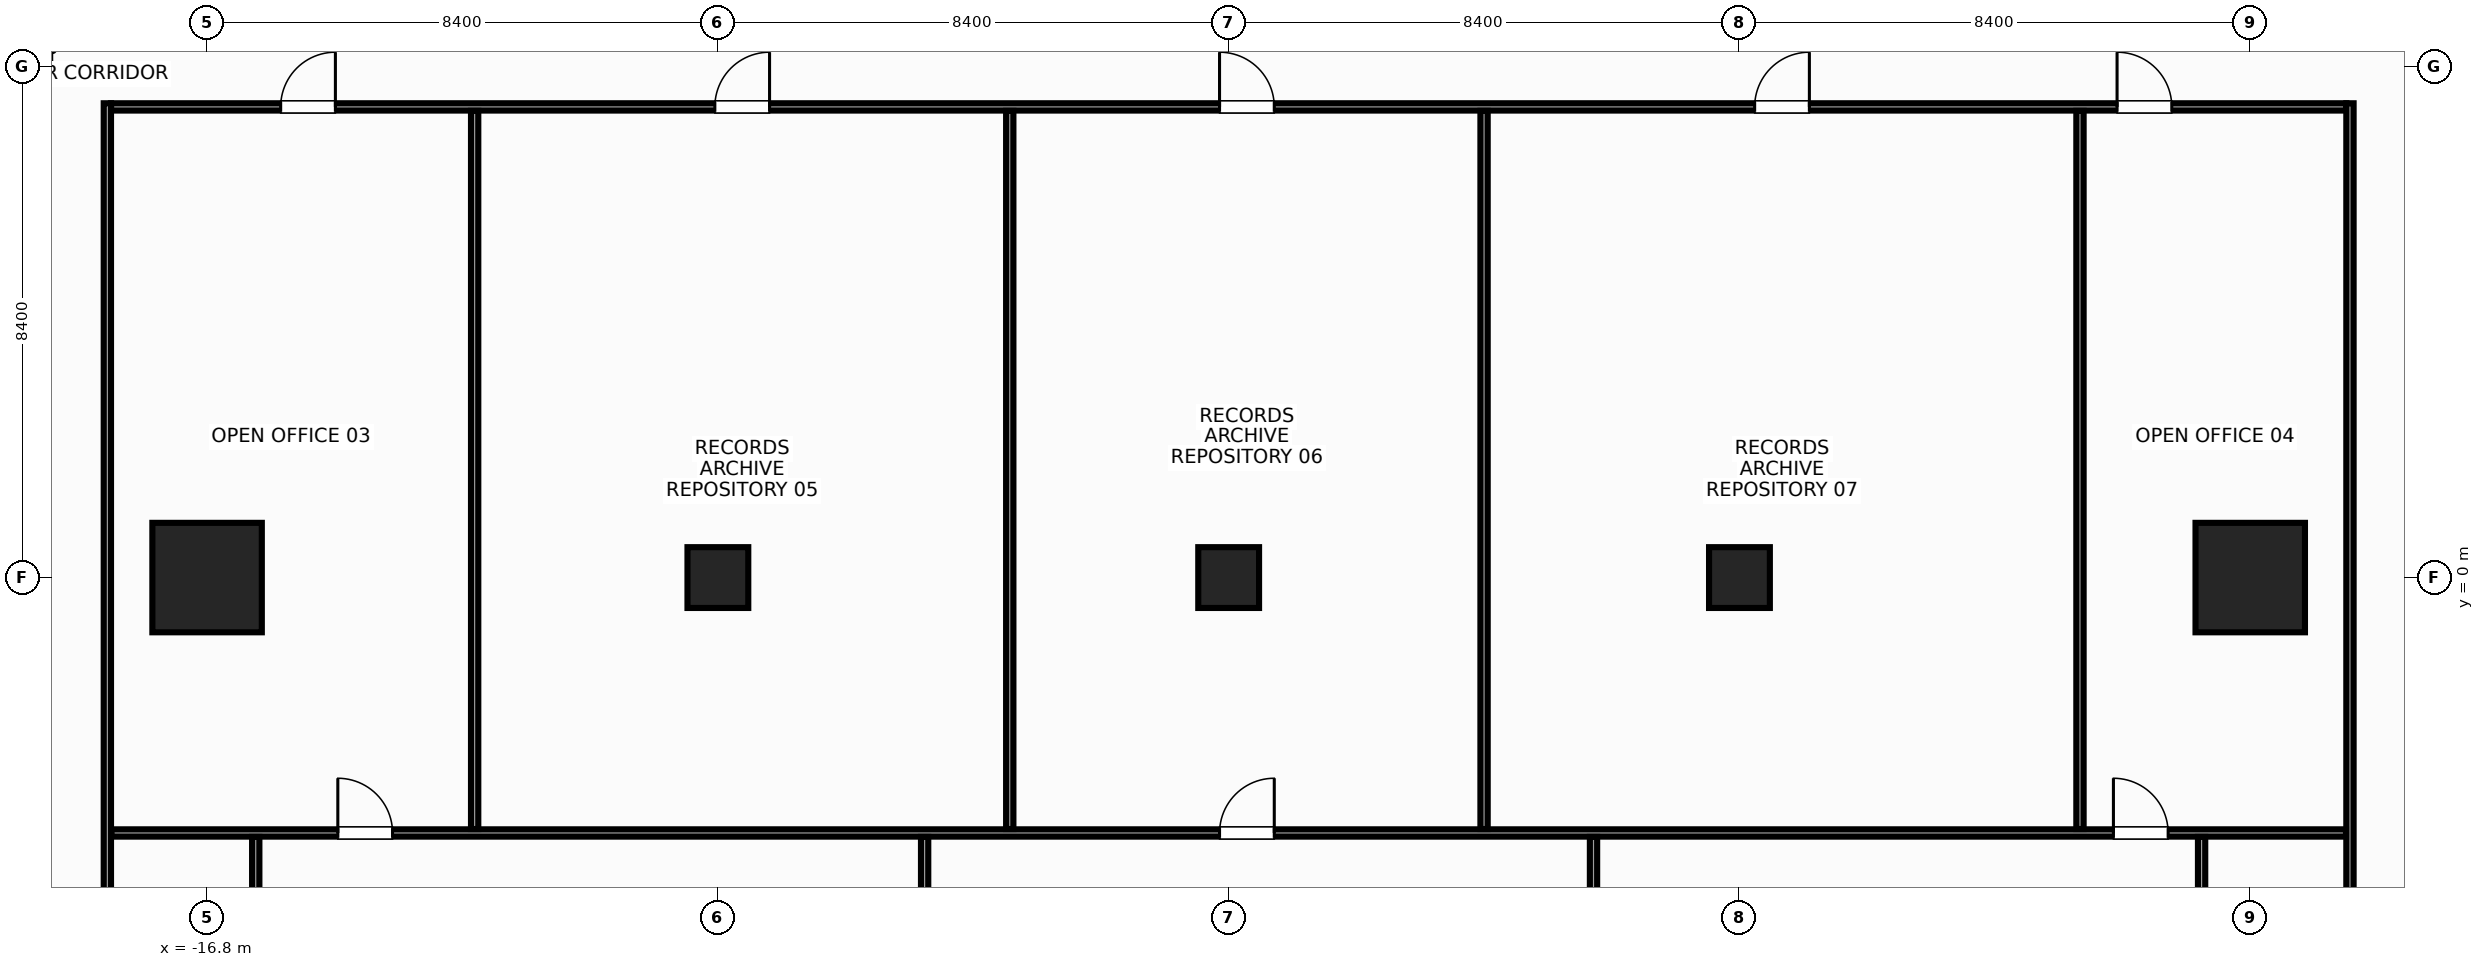
"""IFC4 building model, lengths in metres.
Left out: names, types, materials, properties, quantities, classifications, styles, units other than length and angle.
Written with IfcOpenShell. Run it as: python <this file> out.ifc"""

import sys

from ifc_helpers import new_model, si_unit, direction, frame, frame_2d, origin, origin_with_axes, origin_2d, place, context, subcontext, project, spatial, rectangle, hollow_rectangle, extrude, source, transform, mapped, element, fill, save


model = new_model("IFC4")
c1 = context("Model", 3, precision=1e-05, world=origin(), true_north=direction((0.0, 1.0)))
c2 = subcontext(c1, "Body", "Model", "MODEL_VIEW")
j1 = project(units=[si_unit("LENGTHUNIT", "METRE"), si_unit("PLANEANGLEUNIT", "RADIAN")], contexts=[c1])
p1 = place(None, origin())
s1 = spatial("IfcSite", under=j1, at=p1, CompositionType="ELEMENT")
p2 = place(p1, origin())
s2 = spatial("IfcBuilding", under=s1, at=p2, CompositionType="ELEMENT")
p3 = place(p2, frame((0.0, 0.0, 27.2)))
s3 = spatial("IfcBuildingStorey", under=s2, at=p3, CompositionType="ELEMENT", Elevation=27.2)
m1 = source(origin(), c2, "Body", "SweptSolid", [
    extrude(rectangle(XDim=1.8, YDim=1.8, at=origin_2d()), origin(), (0.0, 0.0, 1.0), 3.6),
])
for number, where, z_axis, x_axis in (
    (1, (-16.8, 0.0, 0.0), (0.0, 0.0, 1.0), (1.0, 0.0, 0.0)),
    (2, (16.8, 0.0, 0.0), (0.0, 0.0, 1.0), (1.0, 0.0, 0.0)),
):
    element("IfcColumn", number, at=place(p3, frame(where, z_axis=z_axis, x_axis=x_axis)), inside=s3, PredefinedType="COLUMN", context=c2, shape_type="MappedRepresentation", body=[
        mapped(m1, transform((0.0, 0.0, 0.0), x_axis=(1.0, 0.0, 0.0), y_axis=(0.0, 1.0, 0.0), z_axis=(0.0, 0.0, 1.0), scale=1.0)),
    ])
m2 = source(origin(), c2, "Body", "SweptSolid", [
    extrude(hollow_rectangle(XDim=1.0, YDim=1.0, WallThickness=0.045, at=origin_2d()), origin(), (0.0, 0.0, 1.0), 3.6),
])
for number, where, z_axis, x_axis in (
    (3, (-8.4, 0.0, 0.0), (0.0, 0.0, 1.0), (1.0, 0.0, 0.0)),
    (4, (8.4, 0.0, 0.0), (0.0, 0.0, 1.0), (1.0, 0.0, 0.0)),
):
    element("IfcColumn", number, at=place(p3, frame(where, z_axis=z_axis, x_axis=x_axis)), inside=s3, PredefinedType="COLUMN", context=c2, shape_type="MappedRepresentation", body=[
        mapped(m2, transform((0.0, 0.0, 0.0), x_axis=(1.0, 0.0, 0.0), y_axis=(0.0, 1.0, 0.0), z_axis=(0.0, 0.0, 1.0), scale=1.0)),
    ])
m3 = source(origin(), c2, "Body", "SweptSolid", [
    extrude(rectangle(XDim=1.0, YDim=1.0, at=origin_2d()), origin(), (0.0, 0.0, 1.0), 3.6),
])
p4 = place(p3, origin_with_axes())
e5 = element("IfcColumn", 5, at=p4, inside=s3, PredefinedType="COLUMN", context=c2, shape_type="MappedRepresentation", body=[
    mapped(m3, transform((0.0, 0.0, 0.0), x_axis=(1.0, 0.0, 0.0), y_axis=(0.0, 1.0, 0.0), z_axis=(0.0, 0.0, 1.0), scale=1.0)),
])
m4 = source(origin(), c2, "Body", "SweptSolid", [
    extrude(rectangle(XDim=36.76, YDim=0.12, at=frame_2d((18.38, 0.0))), origin(), (0.0, 0.0, 1.0), 2.745),
])
p5 = place(p3, frame((-18.38, 7.74, 0.0), z_axis=(0.0, 0.0, 1.0), x_axis=(1.0, 0.0, 0.0)))
e6 = element("IfcWall", 6, at=p5, inside=s3, PredefinedType="PARTITIONING", context=c2, shape_type="MappedRepresentation", body=[
    mapped(m4, transform((0.0, 0.0, 0.0), x_axis=(1.0, 0.0, 0.0), y_axis=(0.0, 1.0, 0.0), z_axis=(0.0, 0.0, 1.0), scale=1.0)),
])
p6 = place(p5, frame((2.79, 0.0, 0.0)))
e7 = element("IfcOpeningElement", 7, at=p6, cuts=e6, PredefinedType="OPENING", context=c2, shape_type="SweptSolid", body=[
    extrude(rectangle(XDim=0.9, YDim=2.15, at=frame_2d((0.45, 1.075))), frame((0.0, 0.072, 0.0), z_axis=(0.0, -1.0, 0.0), x_axis=(1.0, 0.0, 0.0)), (0.0, 0.0, 1.0), 0.144),
])
p7 = place(p5, frame((32.99, 0.0, 0.0)))
e8 = element("IfcOpeningElement", 8, at=p7, cuts=e6, PredefinedType="OPENING", context=c2, shape_type="SweptSolid", body=[
    extrude(rectangle(XDim=0.9, YDim=2.15, at=frame_2d((0.45, 1.075))), frame((0.0, 0.072, 0.0), z_axis=(0.0, -1.0, 0.0), x_axis=(1.0, 0.0, 0.0)), (0.0, 0.0, 1.0), 0.144),
])
p8 = place(p5, frame((9.93, 0.0, 0.0)))
e9 = element("IfcOpeningElement", 9, at=p8, cuts=e6, PredefinedType="OPENING", context=c2, shape_type="SweptSolid", body=[
    extrude(rectangle(XDim=0.9, YDim=2.15, at=frame_2d((0.45, 1.075))), frame((0.0, 0.072, 0.0), z_axis=(0.0, -1.0, 0.0), x_axis=(1.0, 0.0, 0.0)), (0.0, 0.0, 1.0), 0.144),
])
p9 = place(p5, frame((18.23, 0.0, 0.0)))
e10 = element("IfcOpeningElement", 10, at=p9, cuts=e6, PredefinedType="OPENING", context=c2, shape_type="SweptSolid", body=[
    extrude(rectangle(XDim=0.9, YDim=2.15, at=frame_2d((0.45, 1.075))), frame((0.0, 0.072, 0.0), z_axis=(0.0, -1.0, 0.0), x_axis=(1.0, 0.0, 0.0)), (0.0, 0.0, 1.0), 0.144),
])
p10 = place(p5, frame((27.03, 0.0, 0.0)))
e11 = element("IfcOpeningElement", 11, at=p10, cuts=e6, PredefinedType="OPENING", context=c2, shape_type="SweptSolid", body=[
    extrude(rectangle(XDim=0.9, YDim=2.15, at=frame_2d((0.45, 1.075))), frame((0.0, 0.072, 0.0), z_axis=(0.0, -1.0, 0.0), x_axis=(1.0, 0.0, 0.0)), (0.0, 0.0, 1.0), 0.144),
])
m5 = source(origin(), c2, "Body", "SweptSolid", [
    extrude(rectangle(XDim=21.995, YDim=0.12, at=frame_2d((10.998, 0.0))), origin(), (0.0, 0.0, 1.0), 2.745),
])
for number, where, z_axis, x_axis in (
    (12, (-18.44, -14.195, 0.0), (0.0, 0.0, 1.0), (0.0, 1.0, 0.0)),
    (13, (18.44, -14.195, 0.0), (0.0, 0.0, 1.0), (0.0, 1.0, 0.0)),
):
    element("IfcWall", number, at=place(p3, frame(where, z_axis=z_axis, x_axis=x_axis)), inside=s3, PredefinedType="PARTITIONING", context=c2, shape_type="MappedRepresentation", body=[
        mapped(m5, transform((0.0, 0.0, 0.0), x_axis=(1.0, 0.0, 0.0), y_axis=(0.0, 1.0, 0.0), z_axis=(0.0, 0.0, 1.0), scale=1.0)),
    ])
m6 = source(origin(), c2, "Body", "SweptSolid", [
    extrude(rectangle(XDim=36.75, YDim=0.12, at=frame_2d((18.375, 0.0))), origin(), (0.0, 0.0, 1.0), 2.745),
])
p11 = place(p3, frame((-18.375, -4.2, 0.0), z_axis=(0.0, 0.0, 1.0), x_axis=(1.0, 0.0, 0.0)))
e14 = element("IfcWall", 14, at=p11, inside=s3, PredefinedType="PARTITIONING", context=c2, shape_type="MappedRepresentation", body=[
    mapped(m6, transform((0.0, 0.0, 0.0), x_axis=(1.0, 0.0, 0.0), y_axis=(0.0, 1.0, 0.0), z_axis=(0.0, 0.0, 1.0), scale=1.0)),
])
p12 = place(p11, frame((3.725, 0.0, 0.0)))
e15 = element("IfcOpeningElement", 15, at=p12, cuts=e14, PredefinedType="OPENING", context=c2, shape_type="SweptSolid", body=[
    extrude(rectangle(XDim=0.9, YDim=2.15, at=frame_2d((0.45, 1.075))), frame((0.0, 0.072, 0.0), z_axis=(0.0, -1.0, 0.0), x_axis=(1.0, 0.0, 0.0)), (0.0, 0.0, 1.0), 0.144),
])
p13 = place(p11, frame((18.225, 0.0, 0.0)))
e16 = element("IfcOpeningElement", 16, at=p13, cuts=e14, PredefinedType="OPENING", context=c2, shape_type="SweptSolid", body=[
    extrude(rectangle(XDim=0.9, YDim=2.15, at=frame_2d((0.45, 1.075))), frame((0.0, 0.072, 0.0), z_axis=(0.0, -1.0, 0.0), x_axis=(1.0, 0.0, 0.0)), (0.0, 0.0, 1.0), 0.144),
])
p14 = place(p11, frame((32.925, 0.0, 0.0)))
e17 = element("IfcOpeningElement", 17, at=p14, cuts=e14, PredefinedType="OPENING", context=c2, shape_type="SweptSolid", body=[
    extrude(rectangle(XDim=0.9, YDim=2.15, at=frame_2d((0.45, 1.075))), frame((0.0, 0.072, 0.0), z_axis=(0.0, -1.0, 0.0), x_axis=(1.0, 0.0, 0.0)), (0.0, 0.0, 1.0), 0.144),
])
m7 = source(origin(), c2, "Body", "SweptSolid", [
    extrude(rectangle(XDim=11.81, YDim=0.12, at=frame_2d((5.905, 0.0))), origin(), (0.0, 0.0, 1.0), 2.301),
])
for number, where, z_axis, x_axis in (
    (18, (-12.4, -4.135, 0.0), (0.0, 0.0, 1.0), (0.0, 1.0, 0.0)),
    (19, (-3.6, -4.135, 0.0), (0.0, 0.0, 1.0), (0.0, 1.0, 0.0)),
    (20, (4.2, -4.135, 0.0), (0.0, 0.0, 1.0), (0.0, 1.0, 0.0)),
    (21, (14.0, -4.135, 0.0), (0.0, 0.0, 1.0), (0.0, 1.0, 0.0)),
):
    element("IfcWall", number, at=place(p3, frame(where, z_axis=z_axis, x_axis=x_axis)), inside=s3, PredefinedType="PARTITIONING", context=c2, shape_type="MappedRepresentation", body=[
        mapped(m7, transform((0.0, 0.0, 0.0), x_axis=(1.0, 0.0, 0.0), y_axis=(0.0, 1.0, 0.0), z_axis=(0.0, 0.0, 1.0), scale=1.0)),
    ])
m8 = source(origin(), c2, "Body", "SweptSolid", [
    extrude(rectangle(XDim=5.625, YDim=0.12, at=frame_2d((2.812, 0.0))), origin(), (0.0, 0.0, 1.0), 3.36),
])
p15 = place(p3, frame((-16.0, -9.89, 0.0), z_axis=(0.0, 0.0, 1.0), x_axis=(0.0, 1.0, 0.0)))
e22 = element("IfcWall", 22, at=p15, inside=s3, PredefinedType="PARTITIONING", context=c2, shape_type="MappedRepresentation", body=[
    mapped(m8, transform((0.0, 0.0, 0.0), x_axis=(1.0, 0.0, 0.0), y_axis=(0.0, 1.0, 0.0), z_axis=(0.0, 0.0, 1.0), scale=1.0)),
])
m9 = source(origin(), c2, "Body", "SweptSolid", [
    extrude(rectangle(XDim=22.585, YDim=0.12, at=frame_2d((11.292, 0.0))), origin(), (0.0, 0.0, 1.0), 2.745),
])
for number, where, z_axis, x_axis in (
    (23, (-5.0, -26.85, 0.0), (0.0, 0.0, 1.0), (0.0, 1.0, 0.0)),
    (24, (6.0, -26.85, 0.0), (0.0, 0.0, 1.0), (0.0, 1.0, 0.0)),
):
    element("IfcWall", number, at=place(p3, frame(where, z_axis=z_axis, x_axis=x_axis)), inside=s3, PredefinedType="PARTITIONING", context=c2, shape_type="MappedRepresentation", body=[
        mapped(m9, transform((0.0, 0.0, 0.0), x_axis=(1.0, 0.0, 0.0), y_axis=(0.0, 1.0, 0.0), z_axis=(0.0, 0.0, 1.0), scale=1.0)),
    ])
p16 = place(p3, frame((16.0, -9.89, 0.0), z_axis=(0.0, 0.0, 1.0), x_axis=(0.0, 1.0, 0.0)))
e25 = element("IfcWall", 25, at=p16, inside=s3, PredefinedType="PARTITIONING", context=c2, shape_type="MappedRepresentation", body=[
    mapped(m8, transform((0.0, 0.0, 0.0), x_axis=(1.0, 0.0, 0.0), y_axis=(0.0, 1.0, 0.0), z_axis=(0.0, 0.0, 1.0), scale=1.0)),
])
m10 = source(origin(), c2, "Body", "SweptSolid", [
    extrude(rectangle(XDim=0.9, YDim=2.15, at=frame_2d((0.45, 1.075))), frame((0.0, 0.025, 0.0), z_axis=(0.0, -1.0, 0.0), x_axis=(1.0, 0.0, 0.0)), (0.0, 0.0, 1.0), 0.05),
])
p17 = place(p6, origin())
e26 = element("IfcDoor", 26, at=p17, inside=s3, OperationType="SINGLE_SWING_RIGHT", PredefinedType="DOOR", context=c2, shape_type="MappedRepresentation", body=[
    mapped(m10, transform((0.0, 0.0, 0.0), x_axis=(1.0, 0.0, 0.0), y_axis=(0.0, 1.0, 0.0), z_axis=(0.0, 0.0, 1.0), scale=1.0)),
])
fill(e7, e26)
p18 = place(p7, origin())
e27 = element("IfcDoor", 27, at=p18, inside=s3, OperationType="SINGLE_SWING_LEFT", PredefinedType="DOOR", context=c2, shape_type="MappedRepresentation", body=[
    mapped(m10, transform((0.0, 0.0, 0.0), x_axis=(1.0, 0.0, 0.0), y_axis=(0.0, 1.0, 0.0), z_axis=(0.0, 0.0, 1.0), scale=1.0)),
])
fill(e8, e27)
p19 = place(p8, origin())
e28 = element("IfcDoor", 28, at=p19, inside=s3, OperationType="SINGLE_SWING_RIGHT", PredefinedType="DOOR", context=c2, shape_type="MappedRepresentation", body=[
    mapped(m10, transform((0.0, 0.0, 0.0), x_axis=(1.0, 0.0, 0.0), y_axis=(0.0, 1.0, 0.0), z_axis=(0.0, 0.0, 1.0), scale=1.0)),
])
fill(e9, e28)
p20 = place(p9, origin())
e29 = element("IfcDoor", 29, at=p20, inside=s3, OperationType="SINGLE_SWING_LEFT", PredefinedType="DOOR", context=c2, shape_type="MappedRepresentation", body=[
    mapped(m10, transform((0.0, 0.0, 0.0), x_axis=(1.0, 0.0, 0.0), y_axis=(0.0, 1.0, 0.0), z_axis=(0.0, 0.0, 1.0), scale=1.0)),
])
fill(e10, e29)
p21 = place(p10, origin())
e30 = element("IfcDoor", 30, at=p21, inside=s3, OperationType="SINGLE_SWING_RIGHT", PredefinedType="DOOR", context=c2, shape_type="MappedRepresentation", body=[
    mapped(m10, transform((0.0, 0.0, 0.0), x_axis=(1.0, 0.0, 0.0), y_axis=(0.0, 1.0, 0.0), z_axis=(0.0, 0.0, 1.0), scale=1.0)),
])
fill(e11, e30)
p22 = place(p12, origin())
e31 = element("IfcDoor", 31, at=p22, inside=s3, OperationType="SINGLE_SWING_LEFT", PredefinedType="DOOR", context=c2, shape_type="MappedRepresentation", body=[
    mapped(m10, transform((0.0, 0.0, 0.0), x_axis=(1.0, 0.0, 0.0), y_axis=(0.0, 1.0, 0.0), z_axis=(0.0, 0.0, 1.0), scale=1.0)),
])
fill(e15, e31)
p23 = place(p13, origin())
e32 = element("IfcDoor", 32, at=p23, inside=s3, OperationType="SINGLE_SWING_RIGHT", PredefinedType="DOOR", context=c2, shape_type="MappedRepresentation", body=[
    mapped(m10, transform((0.0, 0.0, 0.0), x_axis=(1.0, 0.0, 0.0), y_axis=(0.0, 1.0, 0.0), z_axis=(0.0, 0.0, 1.0), scale=1.0)),
])
fill(e16, e32)
p24 = place(p14, origin())
e33 = element("IfcDoor", 33, at=p24, inside=s3, OperationType="SINGLE_SWING_LEFT", PredefinedType="DOOR", context=c2, shape_type="MappedRepresentation", body=[
    mapped(m10, transform((0.0, 0.0, 0.0), x_axis=(1.0, 0.0, 0.0), y_axis=(0.0, 1.0, 0.0), z_axis=(0.0, 0.0, 1.0), scale=1.0)),
])
fill(e17, e33)
save(model, sys.argv[1])
